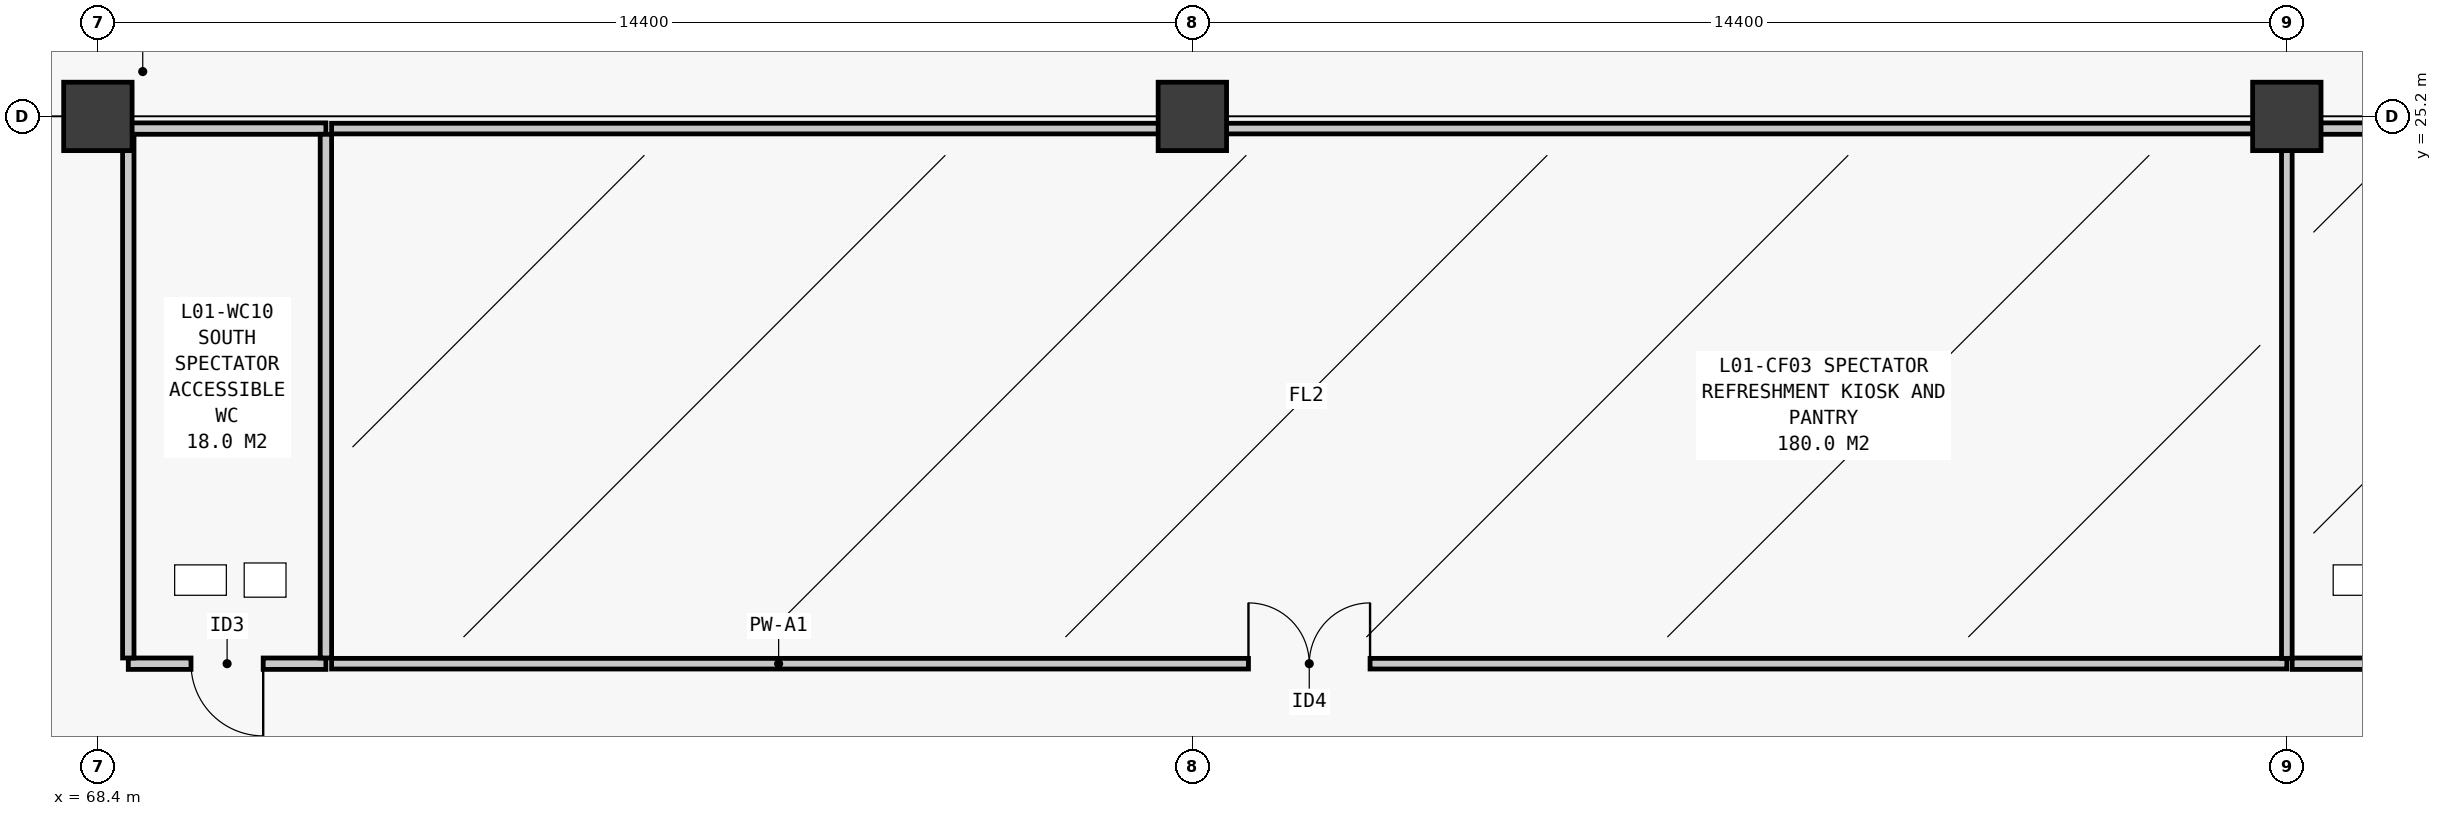
"""IFC4 building model, lengths in metres.
Left out: names, types, materials, properties, quantities, classifications, styles, units other than length and angle.
Written with IfcOpenShell. Run it as: python <this file> out.ifc"""

import sys

from ifc_helpers import new_model, si_unit, direction, frame, frame_2d, origin, origin_2d, place, context, subcontext, project, spatial, rectangle, extrude, element, fill, save


model = new_model("IFC4")
c1 = context("Model", 3, precision=1e-05, world=origin(), true_north=direction((0.0, 1.0)))
c2 = subcontext(c1, "Body", "Model", "MODEL_VIEW")
j1 = project(units=[si_unit("LENGTHUNIT", "METRE"), si_unit("PLANEANGLEUNIT", "RADIAN")], contexts=[c1])
p1 = place(None, origin())
s1 = spatial("IfcSite", under=j1, at=p1, CompositionType="ELEMENT")
p2 = place(p1, origin())
s2 = spatial("IfcBuilding", under=s1, at=p2, CompositionType="ELEMENT")
p3 = place(p2, frame((0.0, 0.0, 4.8)))
s3 = spatial("IfcBuildingStorey", under=s2, at=p3, CompositionType="ELEMENT", Elevation=4.8)
for number, where, z_axis, x_axis in (
    (1, (68.4, 25.2, 0.0), (0.0, 0.0, 1.0), (1.0, 0.0, 0.0)),
    (2, (82.8, 25.2, 0.0), (0.0, 0.0, 1.0), (1.0, 0.0, 0.0)),
    (3, (97.2, 25.2, 0.0), (0.0, 0.0, 1.0), (1.0, 0.0, 0.0)),
):
    element("IfcColumn", number, at=place(p3, frame(where, z_axis=z_axis, x_axis=x_axis)), inside=s3, PredefinedType="COLUMN", context=c2, shape_type="SweptSolid", body=[
        extrude(rectangle(XDim=0.9, YDim=0.9, at=origin_2d()), origin(), (0.0, 0.0, 1.0), 4.2),
    ])
p4 = place(p3, frame((68.8, 18.0, 0.0), z_axis=(0.0, 0.0, 1.0), x_axis=(1.0, 0.0, 0.0)))
e4 = element("IfcWall", 4, at=p4, inside=s3, PredefinedType="PLUMBINGWALL", context=c2, shape_type="SweptSolid", body=[
    extrude(rectangle(XDim=2.6, YDim=0.15, at=frame_2d((1.3, 0.0))), origin(), (0.0, 0.0, 1.0), 3.94),
])
p5 = place(p4, frame((0.825, 0.0, 0.0)))
e5 = element("IfcOpeningElement", 5, at=p5, cuts=e4, PredefinedType="OPENING", context=c2, shape_type="SweptSolid", body=[
    extrude(rectangle(XDim=0.95, YDim=2.1, at=frame_2d((0.475, 1.05))), frame((0.0, 0.09, 0.0), z_axis=(0.0, -1.0, 0.0), x_axis=(1.0, 0.0, 0.0)), (0.0, 0.0, 1.0), 0.18),
])
p6 = place(p3, frame((68.8, 25.04, 0.0), z_axis=(0.0, 0.0, 1.0), x_axis=(1.0, 0.0, 0.0)))
e6 = element("IfcWall", 6, at=p6, inside=s3, PredefinedType="PLUMBINGWALL", context=c2, shape_type="SweptSolid", body=[
    extrude(rectangle(XDim=2.6, YDim=0.15, at=frame_2d((1.3, 0.0))), origin(), (0.0, 0.0, 1.0), 3.252),
])
for number, where, z_axis, x_axis in (
    (7, (68.8, 18.075, 0.0), (0.0, 0.0, 1.0), (0.0, 1.0, 0.0)),
    (8, (71.4, 18.075, 0.0), (0.0, 0.0, 1.0), (0.0, 1.0, 0.0)),
):
    element("IfcWall", number, at=place(p3, frame(where, z_axis=z_axis, x_axis=x_axis)), inside=s3, PredefinedType="PLUMBINGWALL", context=c2, shape_type="SweptSolid", body=[
        extrude(rectangle(XDim=6.89, YDim=0.15, at=frame_2d((3.445, 0.0))), origin(), (0.0, 0.0, 1.0), 3.94),
    ])
p7 = place(p3, frame((71.475, 18.0, 0.0), z_axis=(0.0, 0.0, 1.0), x_axis=(1.0, 0.0, 0.0)))
e9 = element("IfcWall", 9, at=p7, inside=s3, PredefinedType="PARTITIONING", context=c2, shape_type="SweptSolid", body=[
    extrude(rectangle(XDim=25.725, YDim=0.14, at=frame_2d((12.862, 0.0))), origin(), (0.0, 0.0, 1.0), 3.94),
])
p8 = place(p7, frame((12.063, 0.0, 0.0)))
e10 = element("IfcOpeningElement", 10, at=p8, cuts=e9, PredefinedType="OPENING", context=c2, shape_type="SweptSolid", body=[
    extrude(rectangle(XDim=1.6, YDim=2.2, at=frame_2d((0.8, 1.1))), frame((0.0, 0.085, 0.0), z_axis=(0.0, -1.0, 0.0), x_axis=(1.0, 0.0, 0.0)), (0.0, 0.0, 1.0), 0.17),
])
p9 = place(p3, frame((71.475, 25.04, 0.0), z_axis=(0.0, 0.0, 1.0), x_axis=(1.0, 0.0, 0.0)))
e11 = element("IfcWall", 11, at=p9, inside=s3, PredefinedType="PARTITIONING", context=c2, shape_type="SweptSolid", body=[
    extrude(rectangle(XDim=25.725, YDim=0.14, at=frame_2d((12.862, 0.0))), origin(), (0.0, 0.0, 1.0), 3.94),
])
p10 = place(p3, frame((97.2, 18.07, 0.0), z_axis=(0.0, 0.0, 1.0), x_axis=(0.0, 1.0, 0.0)))
e12 = element("IfcWall", 12, at=p10, inside=s3, PredefinedType="PARTITIONING", context=c2, shape_type="SweptSolid", body=[
    extrude(rectangle(XDim=6.9, YDim=0.14, at=frame_2d((3.45, 0.0))), origin(), (0.0, 0.0, 1.0), 3.436),
])
p11 = place(p3, frame((97.27, 18.0, 0.0), z_axis=(0.0, 0.0, 1.0), x_axis=(1.0, 0.0, 0.0)))
e13 = element("IfcWall", 13, at=p11, inside=s3, PredefinedType="PLUMBINGWALL", context=c2, shape_type="SweptSolid", body=[
    extrude(rectangle(XDim=28.59, YDim=0.15, at=frame_2d((14.295, 0.0))), origin(), (0.0, 0.0, 1.0), 3.94),
])
p12 = place(p11, frame((9.488, 0.0, 0.0)))
e14 = element("IfcOpeningElement", 14, at=p12, cuts=e13, PredefinedType="OPENING", context=c2, shape_type="SweptSolid", body=[
    extrude(rectangle(XDim=1.65, YDim=2.25, at=frame_2d((0.825, 1.125))), frame((0.0, 0.09, 0.0), z_axis=(0.0, -1.0, 0.0), x_axis=(1.0, 0.0, 0.0)), (0.0, 0.0, 1.0), 0.18),
])
p13 = place(p3, frame((97.27, 25.04, 0.0), z_axis=(0.0, 0.0, 1.0), x_axis=(1.0, 0.0, 0.0)))
e15 = element("IfcWall", 15, at=p13, inside=s3, PredefinedType="PLUMBINGWALL", context=c2, shape_type="SweptSolid", body=[
    extrude(rectangle(XDim=28.59, YDim=0.15, at=frame_2d((14.295, 0.0))), origin(), (0.0, 0.0, 1.0), 3.252),
])
p14 = place(p5, frame((0.95, 0.0, 0.0), z_axis=(0.0, 0.0, 1.0), x_axis=(-1.0, 0.0, 0.0)))
e16 = element("IfcDoor", 16, at=p14, inside=s3, OperationType="SINGLE_SWING_RIGHT", PredefinedType="DOOR", context=c2, shape_type="SweptSolid", body=[
    extrude(rectangle(XDim=0.95, YDim=2.1, at=frame_2d((0.475, 1.05))), frame((0.0, 0.025, 0.0), z_axis=(0.0, -1.0, 0.0), x_axis=(1.0, 0.0, 0.0)), (0.0, 0.0, 1.0), 0.05),
])
fill(e5, e16)
p15 = place(p8, origin())
e17 = element("IfcDoor", 17, at=p15, inside=s3, OperationType="DOUBLE_DOOR_SINGLE_SWING", PredefinedType="DOOR", context=c2, shape_type="SweptSolid", body=[
    extrude(rectangle(XDim=1.6, YDim=2.2, at=frame_2d((0.8, 1.1))), frame((0.0, 0.025, 0.0), z_axis=(0.0, -1.0, 0.0), x_axis=(1.0, 0.0, 0.0)), (0.0, 0.0, 1.0), 0.05),
])
fill(e10, e17)
save(model, sys.argv[1])
